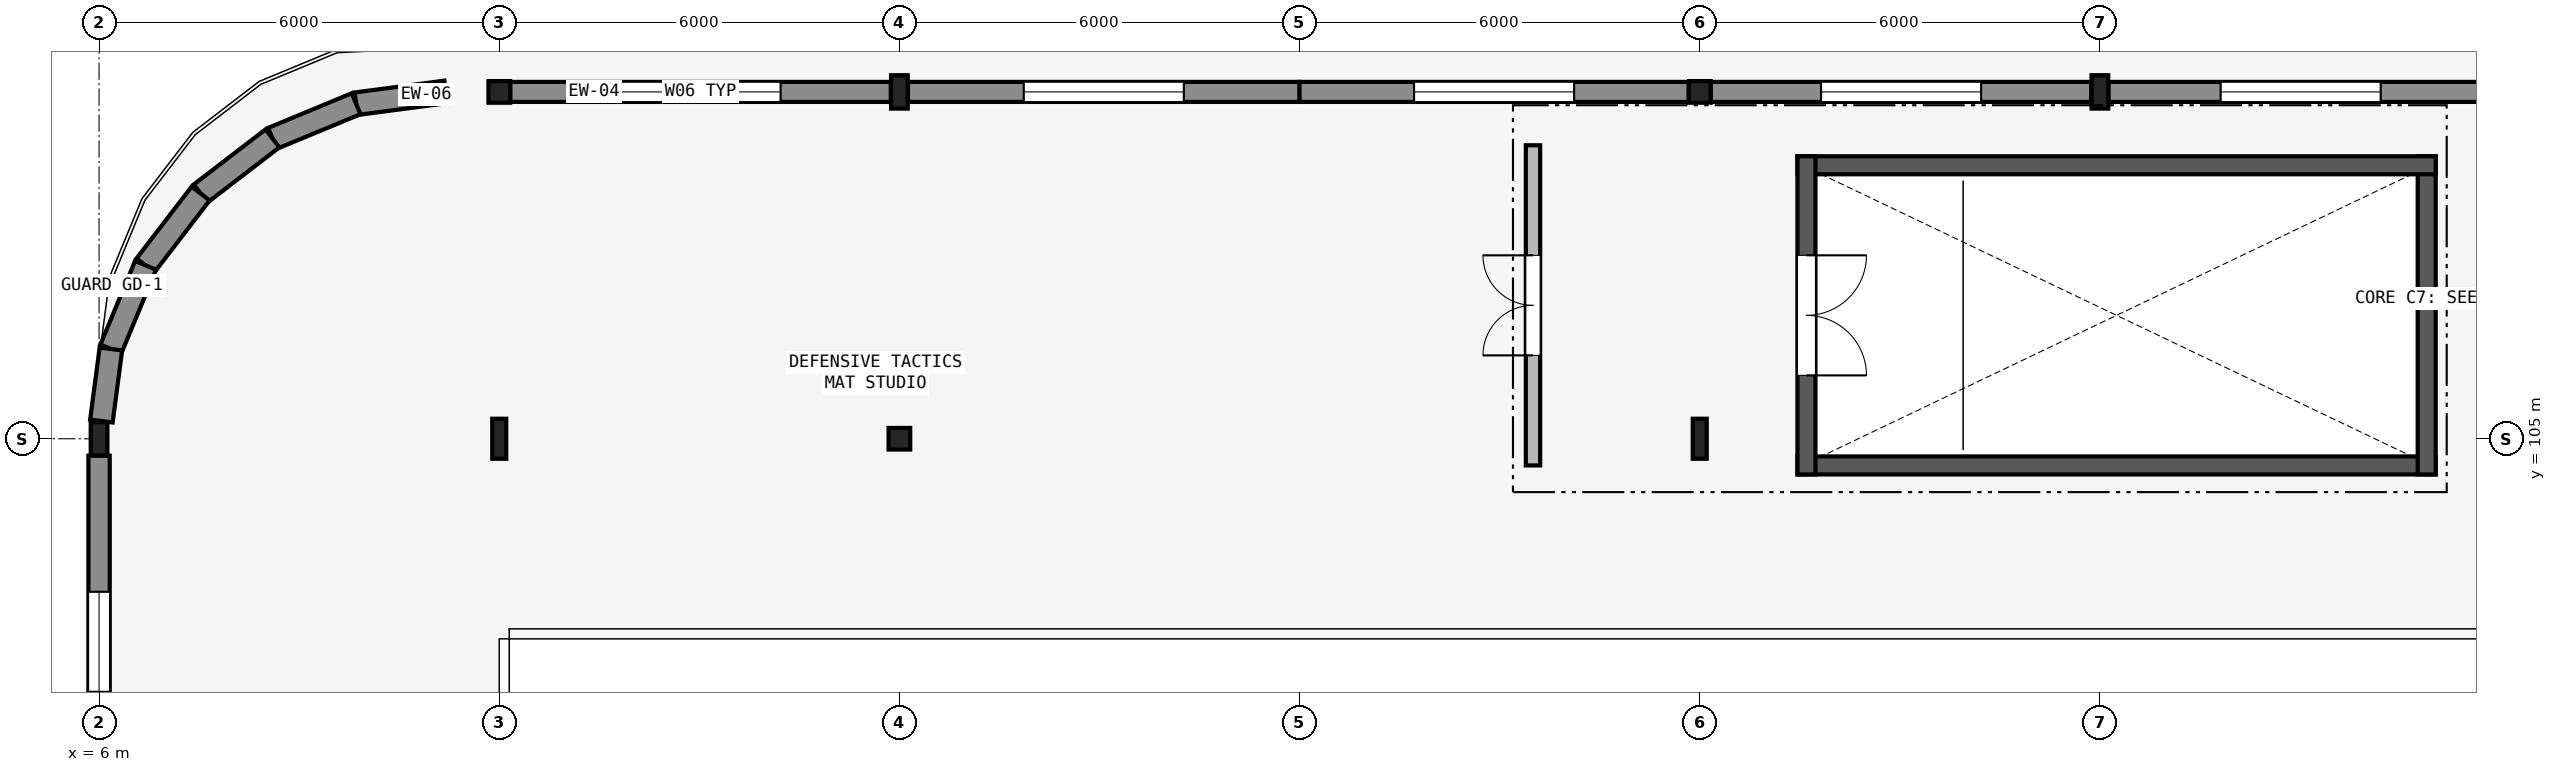
"""IFC4 building model, lengths in metres.
Left out: names, types, materials, properties, quantities, classifications, styles, units other than length and angle.
Written with IfcOpenShell. Run it as: python <this file> out.ifc"""

import sys

from ifc_helpers import new_model, si_unit, direction, frame, frame_2d, origin, origin_2d, place, context, subcontext, project, spatial, rectangle, hollow_circle, i_section, extrude, element, fill, save


model = new_model("IFC4")
c1 = context("Model", 3, precision=1e-05, world=origin(), true_north=direction((0.0, 1.0)))
c2 = subcontext(c1, "Body", "Model", "MODEL_VIEW")
j1 = project(units=[si_unit("LENGTHUNIT", "METRE"), si_unit("PLANEANGLEUNIT", "RADIAN")], contexts=[c1])
p1 = place(None, origin())
s1 = spatial("IfcSite", under=j1, at=p1, CompositionType="ELEMENT")
p2 = place(p1, origin())
s2 = spatial("IfcBuilding", under=s1, at=p2, CompositionType="ELEMENT")
p3 = place(p2, frame((0.0, 0.0, 13.5)))
s3 = spatial("IfcBuildingStorey", under=s2, at=p3, CompositionType="ELEMENT", Elevation=13.5)
p4 = place(p3, frame((6.0, 105.0, 0.0), z_axis=(0.0, 0.0, 1.0), x_axis=(1.0, 0.0, 0.0)))
e1 = element("IfcColumn", 1, at=p4, inside=s3, PredefinedType="COLUMN", context=c2, shape_type="SweptSolid", body=[
    extrude(i_section(OverallWidth=0.25, OverallDepth=0.5, WebThickness=0.01, FlangeThickness=0.015, FilletRadius=0.015, at=origin_2d()), origin(), (0.0, 0.0, 1.0), 4.5),
])
p5 = place(p3, frame((12.0, 105.0, 0.0), z_axis=(0.0, 0.0, 1.0), x_axis=(1.0, 0.0, 0.0)))
e2 = element("IfcColumn", 2, at=p5, inside=s3, PredefinedType="COLUMN", context=c2, shape_type="SweptSolid", body=[
    extrude(i_section(OverallWidth=0.21, OverallDepth=0.6, WebThickness=0.012, FlangeThickness=0.021, FilletRadius=0.02, at=origin_2d()), origin(), (0.0, 0.0, 1.0), 4.5),
])
for number, where, z_axis, x_axis in (
    (3, (12.0, 110.2, 0.0), (0.0, 0.0, 1.0), (1.0, 0.0, 0.0)),
    (4, (18.0, 105.0, 0.0), (0.0, 0.0, 1.0), (1.0, 0.0, 0.0)),
):
    element("IfcColumn", number, at=place(p3, frame(where, z_axis=z_axis, x_axis=x_axis)), inside=s3, PredefinedType="COLUMN", context=c2, shape_type="SweptSolid", body=[
        extrude(hollow_circle(Radius=0.162, WallThickness=0.013, at=origin_2d()), origin(), (0.0, 0.0, 1.0), 4.5),
    ])
p6 = place(p3, frame((18.0, 110.2, 0.0), z_axis=(0.0, 0.0, 1.0), x_axis=(1.0, 0.0, 0.0)))
e5 = element("IfcColumn", 5, at=p6, inside=s3, PredefinedType="COLUMN", context=c2, shape_type="SweptSolid", body=[
    extrude(i_section(OverallWidth=0.25, OverallDepth=0.5, WebThickness=0.01, FlangeThickness=0.015, FilletRadius=0.015, at=origin_2d()), origin(), (0.0, 0.0, 1.0), 4.5),
])
p7 = place(p3, frame((30.0, 105.0, 0.0), z_axis=(0.0, 0.0, 1.0), x_axis=(1.0, 0.0, 0.0)))
e6 = element("IfcColumn", 6, at=p7, inside=s3, PredefinedType="COLUMN", context=c2, shape_type="SweptSolid", body=[
    extrude(i_section(OverallWidth=0.21, OverallDepth=0.6, WebThickness=0.012, FlangeThickness=0.021, FilletRadius=0.02, at=origin_2d()), origin(), (0.0, 0.0, 1.0), 4.5),
])
p8 = place(p3, frame((30.0, 110.2, 0.0), z_axis=(0.0, 0.0, 1.0), x_axis=(1.0, 0.0, 0.0)))
e7 = element("IfcColumn", 7, at=p8, inside=s3, PredefinedType="COLUMN", context=c2, shape_type="SweptSolid", body=[
    extrude(hollow_circle(Radius=0.162, WallThickness=0.013, at=origin_2d()), origin(), (0.0, 0.0, 1.0), 4.5),
])
p9 = place(p3, frame((36.0, 110.2, 0.0), z_axis=(0.0, 0.0, 1.0), x_axis=(1.0, 0.0, 0.0)))
e8 = element("IfcColumn", 8, at=p9, inside=s3, PredefinedType="COLUMN", context=c2, shape_type="SweptSolid", body=[
    extrude(i_section(OverallWidth=0.25, OverallDepth=0.5, WebThickness=0.01, FlangeThickness=0.015, FilletRadius=0.015, at=origin_2d()), origin(), (0.0, 0.0, 1.0), 4.5),
])
p10 = place(p3, frame((6.0, 99.166, 0.0), z_axis=(0.0, 0.0, 1.0), x_axis=(0.0, 1.0, 0.0)))
e9 = element("IfcWall", 9, at=p10, inside=s3, PredefinedType="SOLIDWALL", context=c2, shape_type="SweptSolid", body=[
    extrude(rectangle(XDim=5.58, YDim=0.32, at=frame_2d((2.79, 0.0))), origin(), (0.0, 0.0, 1.0), 3.69),
])
p11 = place(p10, frame((2.04, 0.0, 1.6)))
e10 = element("IfcOpeningElement", 10, at=p11, cuts=e9, PredefinedType="OPENING", context=c2, shape_type="SweptSolid", body=[
    extrude(rectangle(XDim=1.5, YDim=0.6, at=frame_2d((0.75, 0.3))), frame((0.0, 0.17, 0.0), z_axis=(0.0, -1.0, 0.0), x_axis=(1.0, 0.0, 0.0)), (0.0, 0.0, 1.0), 0.34),
])
p12 = place(p3, frame((12.166, 110.2, 0.0), z_axis=(0.0, 0.0, 1.0), x_axis=(1.0, 0.0, 0.0)))
e11 = element("IfcWall", 11, at=p12, inside=s3, PredefinedType="SOLIDWALL", context=c2, shape_type="SweptSolid", body=[
    extrude(rectangle(XDim=5.705, YDim=0.3, at=frame_2d((2.853, 0.0))), origin(), (0.0, 0.0, 1.0), 3.39),
])
p13 = place(p12, frame((1.653, 0.0, 1.1)))
e12 = element("IfcOpeningElement", 12, at=p13, cuts=e11, PredefinedType="OPENING", context=c2, shape_type="SweptSolid", body=[
    extrude(rectangle(XDim=2.4, YDim=1.2, at=frame_2d((1.2, 0.6))), frame((0.0, 0.16, 0.0), z_axis=(0.0, -1.0, 0.0), x_axis=(1.0, 0.0, 0.0)), (0.0, 0.0, 1.0), 0.32),
])
p14 = place(p3, frame((18.129, 110.2, 0.0), z_axis=(0.0, 0.0, 1.0), x_axis=(1.0, 0.0, 0.0)))
e13 = element("IfcWall", 13, at=p14, inside=s3, PredefinedType="SOLIDWALL", context=c2, shape_type="SweptSolid", body=[
    extrude(rectangle(XDim=5.871, YDim=0.3, at=frame_2d((2.936, 0.0))), origin(), (0.0, 0.0, 1.0), 3.39),
])
p15 = place(p14, frame((1.736, 0.0, 1.1)))
e14 = element("IfcOpeningElement", 14, at=p15, cuts=e13, PredefinedType="OPENING", context=c2, shape_type="SweptSolid", body=[
    extrude(rectangle(XDim=2.4, YDim=1.2, at=frame_2d((1.2, 0.6))), frame((0.0, 0.16, 0.0), z_axis=(0.0, -1.0, 0.0), x_axis=(1.0, 0.0, 0.0)), (0.0, 0.0, 1.0), 0.32),
])
p16 = place(p3, frame((24.0, 110.2, 0.0), z_axis=(0.0, 0.0, 1.0), x_axis=(1.0, 0.0, 0.0)))
e15 = element("IfcWall", 15, at=p16, inside=s3, PredefinedType="SOLIDWALL", context=c2, shape_type="SweptSolid", body=[
    extrude(rectangle(XDim=5.834, YDim=0.3, at=frame_2d((2.917, 0.0))), origin(), (0.0, 0.0, 1.0), 3.39),
])
p17 = place(p16, frame((1.717, 0.0, 1.1)))
e16 = element("IfcOpeningElement", 16, at=p17, cuts=e15, PredefinedType="OPENING", context=c2, shape_type="SweptSolid", body=[
    extrude(rectangle(XDim=2.4, YDim=1.2, at=frame_2d((1.2, 0.6))), frame((0.0, 0.16, 0.0), z_axis=(0.0, -1.0, 0.0), x_axis=(1.0, 0.0, 0.0)), (0.0, 0.0, 1.0), 0.32),
])
p18 = place(p3, frame((30.166, 110.2, 0.0), z_axis=(0.0, 0.0, 1.0), x_axis=(1.0, 0.0, 0.0)))
e17 = element("IfcWall", 17, at=p18, inside=s3, PredefinedType="SOLIDWALL", context=c2, shape_type="SweptSolid", body=[
    extrude(rectangle(XDim=5.705, YDim=0.3, at=frame_2d((2.853, 0.0))), origin(), (0.0, 0.0, 1.0), 3.39),
])
p19 = place(p18, frame((1.653, 0.0, 1.1)))
e18 = element("IfcOpeningElement", 18, at=p19, cuts=e17, PredefinedType="OPENING", context=c2, shape_type="SweptSolid", body=[
    extrude(rectangle(XDim=2.4, YDim=1.2, at=frame_2d((1.2, 0.6))), frame((0.0, 0.16, 0.0), z_axis=(0.0, -1.0, 0.0), x_axis=(1.0, 0.0, 0.0)), (0.0, 0.0, 1.0), 0.32),
])
p20 = place(p3, frame((36.129, 110.2, 0.0), z_axis=(0.0, 0.0, 1.0), x_axis=(1.0, 0.0, 0.0)))
e19 = element("IfcWall", 19, at=p20, inside=s3, PredefinedType="SOLIDWALL", context=c2, shape_type="SweptSolid", body=[
    extrude(rectangle(XDim=5.762, YDim=0.3, at=frame_2d((2.881, 0.0))), origin(), (0.0, 0.0, 1.0), 3.74),
])
p21 = place(p20, frame((1.681, 0.0, 1.1)))
e20 = element("IfcOpeningElement", 20, at=p21, cuts=e19, PredefinedType="OPENING", context=c2, shape_type="SweptSolid", body=[
    extrude(rectangle(XDim=2.4, YDim=1.2, at=frame_2d((1.2, 0.6))), frame((0.0, 0.16, 0.0), z_axis=(0.0, -1.0, 0.0), x_axis=(1.0, 0.0, 0.0)), (0.0, 0.0, 1.0), 0.32),
])
p22 = place(p3, frame((11.2, 110.2, 0.0), z_axis=(0.0, 0.0, 1.0), x_axis=(-0.991440211328, -0.130561507967, 0.0)))
e21 = element("IfcWall", 21, at=p22, inside=s3, PredefinedType="SOLIDWALL", context=c2, shape_type="SweptSolid", body=[
    extrude(rectangle(XDim=1.358, YDim=0.34, at=frame_2d((0.679, 0.0))), origin(), (0.0, 0.0, 1.0), 4.195),
])
p23 = place(p3, frame((9.854, 110.023, 0.0), z_axis=(0.0, 0.0, 1.0), x_axis=(-0.923905024937, -0.382621882407, 0.0)))
e22 = element("IfcWall", 22, at=p23, inside=s3, PredefinedType="SOLIDWALL", context=c2, shape_type="SweptSolid", body=[
    extrude(rectangle(XDim=1.357, YDim=0.34, at=frame_2d((0.679, 0.0))), origin(), (0.0, 0.0, 1.0), 4.195),
])
p24 = place(p3, frame((8.6, 109.503, 0.0), z_axis=(0.0, 0.0, 1.0), x_axis=(-0.793392131727, -0.60871087169, 0.0)))
e23 = element("IfcWall", 23, at=p24, inside=s3, PredefinedType="SOLIDWALL", context=c2, shape_type="SweptSolid", body=[
    extrude(rectangle(XDim=1.358, YDim=0.34, at=frame_2d((0.679, 0.0))), origin(), (0.0, 0.0, 1.0), 4.195),
])
for number, where, z_axis, x_axis in (
    (24, (7.523, 108.677, 0.0), (0.0, 0.0, 1.0), (-0.609, -0.793, 0.0)),
    (25, (6.697, 107.6, 0.0), (0.0, 0.0, 1.0), (-0.383, -0.924, 0.0)),
):
    element("IfcWall", number, at=place(p3, frame(where, z_axis=z_axis, x_axis=x_axis)), inside=s3, PredefinedType="SOLIDWALL", context=c2, shape_type="SweptSolid", body=[
        extrude(rectangle(XDim=1.357, YDim=0.34, at=frame_2d((0.679, 0.0))), origin(), (0.0, 0.0, 1.0), 4.195),
    ])
p25 = place(p3, frame((6.177, 106.346, 0.0), z_axis=(0.0, 0.0, 1.0), x_axis=(-0.130651610132, -0.991428341722, 0.0)))
e26 = element("IfcWall", 26, at=p25, inside=s3, PredefinedType="SOLIDWALL", context=c2, shape_type="SweptSolid", body=[
    extrude(rectangle(XDim=1.089, YDim=0.34, at=frame_2d((0.545, 0.0))), origin(), (0.0, 0.0, 1.0), 3.69),
])
p26 = place(p3, frame((31.465, 104.6, 0.0), z_axis=(0.0, 0.0, 1.0), x_axis=(1.0, 0.0, 0.0)))
e27 = element("IfcWall", 27, at=p26, inside=s3, PredefinedType="SHEAR", context=c2, shape_type="SweptSolid", body=[
    extrude(rectangle(XDim=9.57, YDim=0.27, at=frame_2d((4.785, 0.0))), origin(), (0.0, 0.0, 1.0), 4.36),
])
p27 = place(p3, frame((40.9, 104.465, 0.0), z_axis=(0.0, 0.0, 1.0), x_axis=(0.0, 1.0, 0.0)))
e28 = element("IfcWall", 28, at=p27, inside=s3, PredefinedType="SHEAR", context=c2, shape_type="SweptSolid", body=[
    extrude(rectangle(XDim=4.77, YDim=0.27, at=frame_2d((2.385, 0.0))), origin(), (0.0, 0.0, 1.0), 4.36),
])
p28 = place(p3, frame((41.035, 109.1, 0.0), z_axis=(0.0, 0.0, 1.0), x_axis=(-1.0, 0.0, 0.0)))
e29 = element("IfcWall", 29, at=p28, inside=s3, PredefinedType="SHEAR", context=c2, shape_type="SweptSolid", body=[
    extrude(rectangle(XDim=9.57, YDim=0.27, at=frame_2d((4.785, 0.0))), origin(), (0.0, 0.0, 1.0), 4.36),
])
p29 = place(p3, frame((31.6, 109.235, 0.0), z_axis=(0.0, 0.0, 1.0), x_axis=(0.0, -1.0, 0.0)))
e30 = element("IfcWall", 30, at=p29, inside=s3, PredefinedType="SHEAR", context=c2, shape_type="SweptSolid", body=[
    extrude(rectangle(XDim=4.77, YDim=0.27, at=frame_2d((2.385, 0.0))), origin(), (0.0, 0.0, 1.0), 4.36),
])
p30 = place(p29, frame((1.485, 0.0, 0.0)))
e31 = element("IfcOpeningElement", 31, at=p30, cuts=e30, PredefinedType="OPENING", context=c2, shape_type="SweptSolid", body=[
    extrude(rectangle(XDim=1.8, YDim=2.2, at=frame_2d((0.9, 1.1))), frame((0.0, 0.145, 0.0), z_axis=(0.0, -1.0, 0.0), x_axis=(1.0, 0.0, 0.0)), (0.0, 0.0, 1.0), 0.29),
])
p31 = place(p3, frame((27.5, 104.6, 0.0), z_axis=(0.0, 0.0, 1.0), x_axis=(0.0, 1.0, 0.0)))
e32 = element("IfcWall", 32, at=p31, inside=s3, PredefinedType="PARTITIONING", context=c2, shape_type="SweptSolid", body=[
    extrude(rectangle(XDim=4.8, YDim=0.215, at=frame_2d((2.4, 0.0))), origin(), (0.0, 0.0, 1.0), 3.39),
])
p32 = place(p31, frame((1.65, 0.0, 0.0)))
e33 = element("IfcOpeningElement", 33, at=p32, cuts=e32, PredefinedType="OPENING", context=c2, shape_type="SweptSolid", body=[
    extrude(rectangle(XDim=1.5, YDim=2.15, at=frame_2d((0.75, 1.075))), frame((0.0, 0.117, 0.0), z_axis=(0.0, -1.0, 0.0), x_axis=(1.0, 0.0, 0.0)), (0.0, 0.0, 1.0), 0.235),
])
p33 = place(p11, origin())
e34 = element("IfcWindow", 34, at=p33, inside=s3, PartitioningType="SINGLE_PANEL", PredefinedType="WINDOW", context=c2, shape_type="SweptSolid", body=[
    extrude(rectangle(XDim=1.5, YDim=0.6, at=frame_2d((0.75, 0.3))), frame((0.0, 0.03, 0.0), z_axis=(0.0, -1.0, 0.0), x_axis=(1.0, 0.0, 0.0)), (0.0, 0.0, 1.0), 0.06),
])
fill(e10, e34)
p34 = place(p13, origin())
e35 = element("IfcWindow", 35, at=p34, inside=s3, PartitioningType="SINGLE_PANEL", PredefinedType="WINDOW", context=c2, shape_type="SweptSolid", body=[
    extrude(rectangle(XDim=2.4, YDim=1.2, at=frame_2d((1.2, 0.6))), frame((0.0, 0.03, 0.0), z_axis=(0.0, -1.0, 0.0), x_axis=(1.0, 0.0, 0.0)), (0.0, 0.0, 1.0), 0.06),
])
fill(e12, e35)
p35 = place(p15, origin())
e36 = element("IfcWindow", 36, at=p35, inside=s3, PartitioningType="SINGLE_PANEL", PredefinedType="WINDOW", context=c2, shape_type="SweptSolid", body=[
    extrude(rectangle(XDim=2.4, YDim=1.2, at=frame_2d((1.2, 0.6))), frame((0.0, 0.03, 0.0), z_axis=(0.0, -1.0, 0.0), x_axis=(1.0, 0.0, 0.0)), (0.0, 0.0, 1.0), 0.06),
])
fill(e14, e36)
p36 = place(p17, origin())
e37 = element("IfcWindow", 37, at=p36, inside=s3, PartitioningType="SINGLE_PANEL", PredefinedType="WINDOW", context=c2, shape_type="SweptSolid", body=[
    extrude(rectangle(XDim=2.4, YDim=1.2, at=frame_2d((1.2, 0.6))), frame((0.0, 0.03, 0.0), z_axis=(0.0, -1.0, 0.0), x_axis=(1.0, 0.0, 0.0)), (0.0, 0.0, 1.0), 0.06),
])
fill(e16, e37)
p37 = place(p19, origin())
e38 = element("IfcWindow", 38, at=p37, inside=s3, PartitioningType="SINGLE_PANEL", PredefinedType="WINDOW", context=c2, shape_type="SweptSolid", body=[
    extrude(rectangle(XDim=2.4, YDim=1.2, at=frame_2d((1.2, 0.6))), frame((0.0, 0.03, 0.0), z_axis=(0.0, -1.0, 0.0), x_axis=(1.0, 0.0, 0.0)), (0.0, 0.0, 1.0), 0.06),
])
fill(e18, e38)
p38 = place(p21, origin())
e39 = element("IfcWindow", 39, at=p38, inside=s3, PartitioningType="SINGLE_PANEL", PredefinedType="WINDOW", context=c2, shape_type="SweptSolid", body=[
    extrude(rectangle(XDim=2.4, YDim=1.2, at=frame_2d((1.2, 0.6))), frame((0.0, 0.03, 0.0), z_axis=(0.0, -1.0, 0.0), x_axis=(1.0, 0.0, 0.0)), (0.0, 0.0, 1.0), 0.06),
])
fill(e20, e39)
p39 = place(p30, origin())
e40 = element("IfcDoor", 40, at=p39, inside=s3, OperationType="DOUBLE_DOOR_SINGLE_SWING", PredefinedType="DOOR", context=c2, shape_type="SweptSolid", body=[
    extrude(rectangle(XDim=1.8, YDim=2.2, at=frame_2d((0.9, 1.1))), frame((0.0, 0.025, 0.0), z_axis=(0.0, -1.0, 0.0), x_axis=(1.0, 0.0, 0.0)), (0.0, 0.0, 1.0), 0.05),
])
fill(e31, e40)
p40 = place(p32, origin())
e41 = element("IfcDoor", 41, at=p40, inside=s3, OperationType="DOUBLE_DOOR_SINGLE_SWING", PredefinedType="DOOR", context=c2, shape_type="SweptSolid", body=[
    extrude(rectangle(XDim=1.5, YDim=2.15, at=frame_2d((0.75, 1.075))), frame((0.0, 0.025, 0.0), z_axis=(0.0, -1.0, 0.0), x_axis=(1.0, 0.0, 0.0)), (0.0, 0.0, 1.0), 0.05),
])
fill(e33, e41)
save(model, sys.argv[1])
